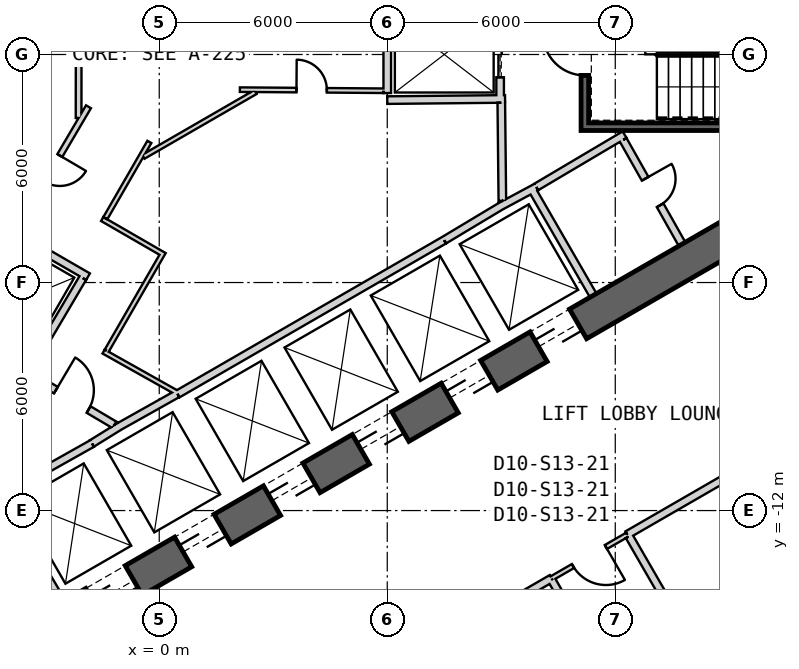
"""IFC4 building model, lengths in metres.
Left out: names, types, materials, properties, quantities, classifications, styles, units other than length and angle.
Written with IfcOpenShell. Run it as: python <this file> out.ifc"""

import sys

from ifc_helpers import new_model, si_unit, direction, frame, frame_2d, origin, place, context, subcontext, project, spatial, rectangle, extrude, element, fill, save


model = new_model("IFC4")
c1 = context("Model", 3, precision=1e-05, world=origin(), true_north=direction((0.0, 1.0)))
c2 = subcontext(c1, "Body", "Model", "MODEL_VIEW")
j1 = project(units=[si_unit("LENGTHUNIT", "METRE"), si_unit("PLANEANGLEUNIT", "RADIAN")], contexts=[c1])
p1 = place(None, origin())
s1 = spatial("IfcSite", under=j1, at=p1, CompositionType="ELEMENT")
p2 = place(p1, origin())
s2 = spatial("IfcBuilding", under=s1, at=p2, CompositionType="ELEMENT")
p3 = place(p2, frame((0.0, 0.0, 217.2)))
s3 = spatial("IfcBuildingStorey", under=s2, at=p3, CompositionType="ELEMENT", Elevation=217.2)
p4 = place(p3, frame((-7.825, -17.97, 0.0), z_axis=(0.0, 0.0, 1.0), x_axis=(0.866028369851, 0.499994862586, 0.0)))
e1 = element("IfcWall", 1, at=p4, inside=s3, PredefinedType="SHEAR", context=c2, shape_type="SweptSolid", body=[
    extrude(rectangle(XDim=31.523, YDim=0.9, at=frame_2d((15.762, 0.0))), origin(), (0.0, 0.0, 1.0), 4.0),
])
p5 = place(p4, frame((7.062, 0.0, 0.0)))
e2 = element("IfcOpeningElement", 2, at=p5, cuts=e1, PredefinedType="OPENING", context=c2, shape_type="SweptSolid", body=[
    extrude(rectangle(XDim=1.2, YDim=2.4, at=frame_2d((0.6, 1.2))), frame((0.0, 0.46, 0.0), z_axis=(0.0, -1.0, 0.0), x_axis=(1.0, 0.0, 0.0)), (0.0, 0.0, 1.0), 0.92),
])
p6 = place(p4, frame((9.762, 0.0, 0.0)))
e3 = element("IfcOpeningElement", 3, at=p6, cuts=e1, PredefinedType="OPENING", context=c2, shape_type="SweptSolid", body=[
    extrude(rectangle(XDim=1.2, YDim=2.4, at=frame_2d((0.6, 1.2))), frame((0.0, 0.46, 0.0), z_axis=(0.0, -1.0, 0.0), x_axis=(1.0, 0.0, 0.0)), (0.0, 0.0, 1.0), 0.92),
])
p7 = place(p4, frame((12.462, 0.0, 0.0)))
e4 = element("IfcOpeningElement", 4, at=p7, cuts=e1, PredefinedType="OPENING", context=c2, shape_type="SweptSolid", body=[
    extrude(rectangle(XDim=1.2, YDim=2.4, at=frame_2d((0.6, 1.2))), frame((0.0, 0.46, 0.0), z_axis=(0.0, -1.0, 0.0), x_axis=(1.0, 0.0, 0.0)), (0.0, 0.0, 1.0), 0.92),
])
p8 = place(p4, frame((15.162, 0.0, 0.0)))
e5 = element("IfcOpeningElement", 5, at=p8, cuts=e1, PredefinedType="OPENING", context=c2, shape_type="SweptSolid", body=[
    extrude(rectangle(XDim=1.2, YDim=2.4, at=frame_2d((0.6, 1.2))), frame((0.0, 0.46, 0.0), z_axis=(0.0, -1.0, 0.0), x_axis=(1.0, 0.0, 0.0)), (0.0, 0.0, 1.0), 0.92),
])
p9 = place(p4, frame((17.862, 0.0, 0.0)))
e6 = element("IfcOpeningElement", 6, at=p9, cuts=e1, PredefinedType="OPENING", context=c2, shape_type="SweptSolid", body=[
    extrude(rectangle(XDim=1.2, YDim=2.4, at=frame_2d((0.6, 1.2))), frame((0.0, 0.46, 0.0), z_axis=(0.0, -1.0, 0.0), x_axis=(1.0, 0.0, 0.0)), (0.0, 0.0, 1.0), 0.92),
])
p10 = place(p4, frame((20.562, 0.0, 0.0)))
e7 = element("IfcOpeningElement", 7, at=p10, cuts=e1, PredefinedType="OPENING", context=c2, shape_type="SweptSolid", body=[
    extrude(rectangle(XDim=1.2, YDim=2.4, at=frame_2d((0.6, 1.2))), frame((0.0, 0.46, 0.0), z_axis=(0.0, -1.0, 0.0), x_axis=(1.0, 0.0, 0.0)), (0.0, 0.0, 1.0), 0.92),
])
p11 = place(p4, frame((26.712, 0.0, 0.0)))
e8 = element("IfcOpeningElement", 8, at=p11, cuts=e1, PredefinedType="OPENING", context=c2, shape_type="SweptSolid", body=[
    extrude(rectangle(XDim=1.2, YDim=2.4, at=frame_2d((0.6, 1.2))), frame((0.0, 0.46, 0.0), z_axis=(0.0, -1.0, 0.0), x_axis=(1.0, 0.0, 0.0)), (0.0, 0.0, 1.0), 0.92),
])
p12 = place(p4, frame((3.612, 0.0, 0.0)))
e9 = element("IfcOpeningElement", 9, at=p12, cuts=e1, PredefinedType="OPENING", context=c2, shape_type="SweptSolid", body=[
    extrude(rectangle(XDim=1.2, YDim=2.4, at=frame_2d((0.6, 1.2))), frame((0.0, 0.46, 0.0), z_axis=(0.0, -1.0, 0.0), x_axis=(1.0, 0.0, 0.0)), (0.0, 0.0, 1.0), 0.92),
])
p13 = place(p3, frame((0.483, -8.936, 0.0), z_axis=(0.0, 0.0, 1.0), x_axis=(0.866030989016, 0.499990325971, 0.0)))
e10 = element("IfcWall", 10, at=p13, inside=s3, PredefinedType="PLUMBINGWALL", context=c2, shape_type="SweptSolid", body=[
    extrude(rectangle(XDim=8.1, YDim=0.2, at=frame_2d((4.05, 0.0))), origin(), (0.0, 0.0, 1.0), 3.7),
])
p14 = place(p3, frame((9.795, -3.525, 0.0), z_axis=(0.0, 0.0, 1.0), x_axis=(0.499984717929, -0.866034226713, 0.0)))
e11 = element("IfcWall", 11, at=p14, inside=s3, PredefinedType="PLUMBINGWALL", context=c2, shape_type="SweptSolid", body=[
    extrude(rectangle(XDim=3.25, YDim=0.2, at=frame_2d((1.625, 0.0))), origin(), (0.0, 0.0, 1.0), 3.7),
])
p15 = place(p3, frame((8.974, -3.999, 0.0), z_axis=(0.0, 0.0, 1.0), x_axis=(0.880907015104, 0.473289373154, 0.0)))
e12 = element("IfcWall", 12, at=p15, inside=s3, PredefinedType="PLUMBINGWALL", context=c2, shape_type="SweptSolid", body=[
    extrude(rectangle(XDim=1.078, YDim=0.2, at=frame_2d((0.539, 0.0))), origin(), (0.0, 0.0, 1.0), 3.7),
])
p16 = place(p3, frame((7.497, -4.886, 0.0), z_axis=(0.0, 0.0, 1.0), x_axis=(0.857516281273, 0.51445682749, 0.0)))
e13 = element("IfcWall", 13, at=p16, inside=s3, PredefinedType="PLUMBINGWALL", context=c2, shape_type="SweptSolid", body=[
    extrude(rectangle(XDim=1.845, YDim=0.2, at=frame_2d((0.922, 0.0))), origin(), (0.0, 0.0, 1.0), 3.7),
])
p17 = place(p3, frame((-2.558, -14.409, 0.0), z_axis=(0.0, 0.0, 1.0), x_axis=(-0.507997497166, 0.861358544901, 0.0)))
e14 = element("IfcWall", 14, at=p17, inside=s3, PredefinedType="PLUMBINGWALL", context=c2, shape_type="SweptSolid", body=[
    extrude(rectangle(XDim=3.35, YDim=0.2, at=frame_2d((1.675, 0.0))), origin(), (0.0, 0.0, 1.0), 3.7),
])
p18 = place(p3, frame((-1.769, -10.237, 0.0), z_axis=(0.0, 0.0, 1.0), x_axis=(-0.871534483978, -0.490334215854, 0.0)))
e15 = element("IfcWall", 15, at=p18, inside=s3, PredefinedType="PLUMBINGWALL", context=c2, shape_type="SweptSolid", body=[
    extrude(rectangle(XDim=2.7, YDim=0.2, at=frame_2d((1.35, 0.0))), origin(), (0.0, 0.0, 1.0), 3.7),
])
p19 = place(p3, frame((-1.024, -9.771, 0.0), z_axis=(0.0, 0.0, 1.0), x_axis=(-0.850348075135, -0.526220629693, 0.0)))
e16 = element("IfcWall", 16, at=p19, inside=s3, PredefinedType="PLUMBINGWALL", context=c2, shape_type="SweptSolid", body=[
    extrude(rectangle(XDim=0.878, YDim=0.2, at=frame_2d((0.439, 0.0))), origin(), (0.0, 0.0, 1.0), 3.7),
])
p20 = place(p3, frame((-1.13, -9.832, 0.0), z_axis=(0.0, 0.0, 1.0), x_axis=(0.871988740738, 0.489525929882, 0.0)))
e17 = element("IfcWall", 17, at=p20, inside=s3, PredefinedType="PLUMBINGWALL", context=c2, shape_type="SweptSolid", body=[
    extrude(rectangle(XDim=1.845, YDim=0.2, at=frame_2d((0.922, 0.0))), origin(), (0.0, 0.0, 1.0), 3.7),
])
p21 = place(p3, frame((11.1, -1.9, -0.3), z_axis=(0.0, 0.0, 1.0), x_axis=(1.0, 0.0, 0.0)))
e18 = element("IfcWall", 18, at=p21, inside=s3, PredefinedType="SHEAR", context=c2, shape_type="SweptSolid", body=[
    extrude(rectangle(XDim=7.9, YDim=0.2, at=frame_2d((3.95, 0.0))), origin(), (0.0, 0.0, 1.0), 4.0),
])
p22 = place(p3, frame((11.2, -1.8, -0.3), z_axis=(0.0, 0.0, 1.0), x_axis=(0.0, 1.0, 0.0)))
e19 = element("IfcWall", 19, at=p22, inside=s3, PredefinedType="SHEAR", context=c2, shape_type="SweptSolid", body=[
    extrude(rectangle(XDim=3.6, YDim=0.2, at=frame_2d((1.8, 0.0))), origin(), (0.0, 0.0, 1.0), 4.0),
])
p23 = place(p22, frame((1.25, 0.0, 0.3)))
e20 = element("IfcOpeningElement", 20, at=p23, cuts=e19, PredefinedType="OPENING", context=c2, shape_type="SweptSolid", body=[
    extrude(rectangle(XDim=1.1, YDim=2.1, at=frame_2d((0.55, 1.05))), frame((0.0, 0.11, 0.0), z_axis=(0.0, -1.0, 0.0), x_axis=(1.0, 0.0, 0.0)), (0.0, 0.0, 1.0), 0.22),
])
p24 = place(p3, frame((8.97, 1.2, 0.0), z_axis=(0.0, 0.0, 1.0), x_axis=(0.0, -1.0, 0.0)))
e21 = element("IfcWall", 21, at=p24, inside=s3, PredefinedType="PLUMBINGWALL", context=c2, shape_type="SweptSolid", body=[
    extrude(rectangle(XDim=2.4, YDim=0.2, at=frame_2d((1.2, 0.0))), origin(), (0.0, 0.0, 1.0), 3.7),
])
p25 = place(p24, frame((0.6, 0.0, 0.0)))
e22 = element("IfcOpeningElement", 22, at=p25, cuts=e21, PredefinedType="OPENING", context=c2, shape_type="SweptSolid", body=[
    extrude(rectangle(XDim=1.2, YDim=2.4, at=frame_2d((0.6, 1.2))), frame((0.0, 0.11, 0.0), z_axis=(0.0, -1.0, 0.0), x_axis=(1.0, 0.0, 0.0)), (0.0, 0.0, 1.0), 0.22),
])
p26 = place(p3, frame((9.1, -1.169, 0.0), z_axis=(0.0, 0.0, 1.0), x_axis=(-0.999949988, -0.010001074852, 0.0)))
e23 = element("IfcWall", 23, at=p26, inside=s3, PredefinedType="PLUMBINGWALL", context=c2, shape_type="SweptSolid", body=[
    extrude(rectangle(XDim=3.1, YDim=0.2, at=frame_2d((1.55, 0.0))), origin(), (0.0, 0.0, 1.0), 3.7),
])
p27 = place(p3, frame((6.0, -1.014, 0.0), z_axis=(0.0, 0.0, 1.0), x_axis=(0.0, 1.0, 0.0)))
e24 = element("IfcWall", 24, at=p27, inside=s3, PredefinedType="PLUMBINGWALL", context=c2, shape_type="SweptSolid", body=[
    extrude(rectangle(XDim=2.314, YDim=0.2, at=frame_2d((1.157, 0.0))), origin(), (0.0, 0.0, 1.0), 3.7),
])
p28 = place(p3, frame((-3.892, -4.681, 0.0), z_axis=(0.0, 0.0, 1.0), x_axis=(0.866009305107, -0.50002788269, 0.0)))
e25 = element("IfcWall", 25, at=p28, inside=s3, PredefinedType="PLUMBINGWALL", context=c2, shape_type="SweptSolid", body=[
    extrude(rectangle(XDim=2.329, YDim=0.2, at=frame_2d((1.165, 0.0))), origin(), (0.0, 0.0, 1.0), 3.7),
])
p29 = place(p3, frame((-2.012, -5.882, 0.0), z_axis=(0.0, 0.0, 1.0), x_axis=(-0.508619639323, -0.860991325447, 0.0)))
e26 = element("IfcWall", 26, at=p29, inside=s3, PredefinedType="PLUMBINGWALL", context=c2, shape_type="SweptSolid", body=[
    extrude(rectangle(XDim=3.0, YDim=0.2, at=frame_2d((1.5, 0.0))), origin(), (0.0, 0.0, 1.0), 3.7),
])
p30 = place(p3, frame((12.245, -2.109, 0.0), z_axis=(0.0, 0.0, 1.0), x_axis=(-0.860414880418, -0.509594185166, 0.0)))
e27 = element("IfcWall", 27, at=p30, inside=s3, PredefinedType="PARTITIONING", context=c2, shape_type="SweptSolid", body=[
    extrude(rectangle(XDim=2.7, YDim=0.2, at=frame_2d((1.35, 0.0))), origin(), (0.0, 0.0, 1.0), 3.7),
])
p31 = place(p3, frame((13.758, -4.99, 0.0), z_axis=(0.0, 0.0, 1.0), x_axis=(-0.491993409184, 0.87059892334, 0.0)))
e28 = element("IfcWall", 28, at=p31, inside=s3, PredefinedType="PARTITIONING", context=c2, shape_type="SweptSolid", body=[
    extrude(rectangle(XDim=3.15, YDim=0.2, at=frame_2d((1.575, 0.0))), origin(), (0.0, 0.0, 1.0), 3.7),
])
p32 = place(p31, frame((1.175, 0.0, 0.0)))
e29 = element("IfcOpeningElement", 29, at=p32, cuts=e28, PredefinedType="OPENING", context=c2, shape_type="SweptSolid", body=[
    extrude(rectangle(XDim=0.8, YDim=2.1, at=frame_2d((0.4, 1.05))), frame((0.0, 0.11, 0.0), z_axis=(0.0, -1.0, 0.0), x_axis=(1.0, 0.0, 0.0)), (0.0, 0.0, 1.0), 0.22),
])
p33 = place(p3, frame((9.029, -3.851, 0.0), z_axis=(0.0, 0.0, 1.0), x_axis=(-0.010784614026, 0.999941844359, 0.0)))
e30 = element("IfcWall", 30, at=p33, inside=s3, PredefinedType="PARTITIONING", context=c2, shape_type="SweptSolid", body=[
    extrude(rectangle(XDim=2.581, YDim=0.2, at=frame_2d((1.291, 0.0))), origin(), (0.0, 0.0, 1.0), 3.7),
])
p34 = place(p3, frame((-3.401, -8.43, 0.0), z_axis=(0.0, 0.0, 1.0), x_axis=(0.860598681535, -0.509283721849, 0.0)))
e31 = element("IfcWall", 31, at=p34, inside=s3, PredefinedType="PARTITIONING", context=c2, shape_type="SweptSolid", body=[
    extrude(rectangle(XDim=2.581, YDim=0.2, at=frame_2d((1.291, 0.0))), origin(), (0.0, 0.0, 1.0), 3.7),
])
p35 = place(p34, frame((0.791, 0.0, 0.0)))
e32 = element("IfcOpeningElement", 32, at=p35, cuts=e31, PredefinedType="OPENING", context=c2, shape_type="SweptSolid", body=[
    extrude(rectangle(XDim=1.0, YDim=2.1, at=frame_2d((0.5, 1.05))), frame((0.0, 0.11, 0.0), z_axis=(0.0, -1.0, 0.0), x_axis=(1.0, 0.0, 0.0)), (0.0, 0.0, 1.0), 0.22),
])
p36 = place(p3, frame((-2.122, -1.67, 0.0), z_axis=(0.0, 0.0, 1.0), x_axis=(0.00126831916, 0.999999195683, 0.0)))
e33 = element("IfcWall", 33, at=p36, inside=s3, PredefinedType="PLUMBINGWALL", context=c2, shape_type="SweptSolid", body=[
    extrude(rectangle(XDim=3.465, YDim=0.15, at=frame_2d((1.732, 0.0))), origin(), (0.0, 0.0, 1.0), 3.7),
])
p37 = place(p3, frame((-3.776, -4.633, 0.0), z_axis=(0.0, 0.0, 1.0), x_axis=(0.506548448152, 0.862211499387, 0.0)))
e34 = element("IfcWall", 34, at=p37, inside=s3, PredefinedType="PLUMBINGWALL", context=c2, shape_type="SweptSolid", body=[
    extrude(rectangle(XDim=3.778, YDim=0.15, at=frame_2d((1.889, 0.0))), origin(), (0.0, 0.0, 1.0), 3.7),
])
p38 = place(p37, frame((1.489, 0.0, 0.0)))
e35 = element("IfcOpeningElement", 35, at=p38, cuts=e34, PredefinedType="OPENING", context=c2, shape_type="SweptSolid", body=[
    extrude(rectangle(XDim=0.8, YDim=2.1, at=frame_2d((0.4, 1.05))), frame((0.0, 0.085, 0.0), z_axis=(0.0, -1.0, 0.0), x_axis=(1.0, 0.0, 0.0)), (0.0, 0.0, 1.0), 0.17),
])
p39 = place(p3, frame((-1.464, -7.816, 0.0), z_axis=(0.0, 0.0, 1.0), x_axis=(0.871880202732, -0.489719217597, 0.0)))
e36 = element("IfcWall", 36, at=p39, inside=s3, PredefinedType="PARTITIONING", context=c2, shape_type="SweptSolid", body=[
    extrude(rectangle(XDim=2.224, YDim=0.12, at=frame_2d((1.112, 0.0))), origin(), (0.0, 0.0, 1.0), 3.7),
])
p40 = place(p3, frame((0.118, -5.195, 0.0), z_axis=(0.0, 0.0, 1.0), x_axis=(-0.499990139034, -0.866031096941, 0.0)))
e37 = element("IfcWall", 37, at=p40, inside=s3, PredefinedType="PARTITIONING", context=c2, shape_type="SweptSolid", body=[
    extrude(rectangle(XDim=3.0, YDim=0.12, at=frame_2d((1.5, 0.0))), origin(), (0.0, 0.0, 1.0), 3.7),
])
p41 = place(p3, frame((-1.501, -4.33, 0.0), z_axis=(0.0, 0.0, 1.0), x_axis=(0.866059624469, -0.499940723351, 0.0)))
e38 = element("IfcWall", 38, at=p41, inside=s3, PredefinedType="PARTITIONING", context=c2, shape_type="SweptSolid", body=[
    extrude(rectangle(XDim=1.775, YDim=0.12, at=frame_2d((0.888, 0.0))), origin(), (0.0, 0.0, 1.0), 3.7),
])
p42 = place(p3, frame((-0.26, -2.3, 0.0), z_axis=(0.0, 0.0, 1.0), x_axis=(-0.500035443578, -0.866004939458, 0.0)))
e39 = element("IfcWall", 39, at=p42, inside=s3, PredefinedType="PARTITIONING", context=c2, shape_type="SweptSolid", body=[
    extrude(rectangle(XDim=2.318, YDim=0.12, at=frame_2d((1.159, 0.0))), origin(), (0.0, 0.0, 1.0), 3.7),
])
p43 = place(p3, frame((2.532, -0.988, 0.0), z_axis=(0.0, 0.0, 1.0), x_axis=(-0.866023141178, -0.500003918929, 0.0)))
e40 = element("IfcWall", 40, at=p43, inside=s3, PredefinedType="PARTITIONING", context=c2, shape_type="SweptSolid", body=[
    extrude(rectangle(XDim=3.404, YDim=0.12, at=frame_2d((1.702, 0.0))), origin(), (0.0, 0.0, 1.0), 3.7),
])
p44 = place(p3, frame((5.9, -0.954, 0.0), z_axis=(0.0, 0.0, 1.0), x_axis=(-0.999970929415, 0.00762498027, 0.0)))
e41 = element("IfcWall", 41, at=p44, inside=s3, PredefinedType="PARTITIONING", context=c2, shape_type="SweptSolid", body=[
    extrude(rectangle(XDim=3.778, YDim=0.12, at=frame_2d((1.889, 0.0))), origin(), (0.0, 0.0, 1.0), 3.7),
])
p45 = place(p44, frame((1.489, 0.0, 0.0)))
e42 = element("IfcOpeningElement", 42, at=p45, cuts=e41, PredefinedType="OPENING", context=c2, shape_type="SweptSolid", body=[
    extrude(rectangle(XDim=0.8, YDim=2.1, at=frame_2d((0.4, 1.05))), frame((0.0, 0.07, 0.0), z_axis=(0.0, -1.0, 0.0), x_axis=(1.0, 0.0, 0.0)), (0.0, 0.0, 1.0), 0.14),
])
p46 = place(p3, frame((12.317, -12.634, 0.0), z_axis=(0.0, 0.0, 1.0), x_axis=(-0.86602648383, -0.499998129301, 0.0)))
e43 = element("IfcWall", 43, at=p46, inside=s3, PredefinedType="PARTITIONING", context=c2, shape_type="SweptSolid", body=[
    extrude(rectangle(XDim=2.3, YDim=0.12, at=frame_2d((1.15, 0.0))), origin(), (0.0, 0.0, 1.0), 3.7),
])
p47 = place(p46, frame((0.65, 0.0, 0.0)))
e44 = element("IfcOpeningElement", 44, at=p47, cuts=e43, PredefinedType="OPENING", context=c2, shape_type="SweptSolid", body=[
    extrude(rectangle(XDim=1.0, YDim=2.1, at=frame_2d((0.5, 1.05))), frame((0.0, 0.07, 0.0), z_axis=(0.0, -1.0, 0.0), x_axis=(1.0, 0.0, 0.0)), (0.0, 0.0, 1.0), 0.14),
])
p48 = place(p3, frame((-6.019, -23.22, 0.0), z_axis=(0.0, 0.0, 1.0), x_axis=(0.86602143297, 0.50000687759, 0.0)))
e45 = element("IfcWall", 45, at=p48, inside=s3, PredefinedType="PARTITIONING", context=c2, shape_type="SweptSolid", body=[
    extrude(rectangle(XDim=18.873, YDim=0.2, at=frame_2d((9.437, 0.0))), origin(), (0.0, 0.0, 1.0), 2.88),
])
p49 = place(p3, frame((12.317, -12.634, 0.0), z_axis=(0.0, 0.0, 1.0), x_axis=(0.866028561818, 0.499994530085, 0.0)))
e46 = element("IfcWall", 46, at=p49, inside=s3, PredefinedType="PARTITIONING", context=c2, shape_type="SweptSolid", body=[
    extrude(rectangle(XDim=12.273, YDim=0.2, at=frame_2d((6.136, 0.0))), origin(), (0.0, 0.0, 1.0), 2.88),
])
p50 = place(p3, frame((18.412, -23.15, 0.0), z_axis=(0.0, 0.0, 1.0), x_axis=(-0.500010196161, 0.866019516948, 0.0)))
e47 = element("IfcWall", 47, at=p50, inside=s3, PredefinedType="PARTITIONING", context=c2, shape_type="SweptSolid", body=[
    extrude(rectangle(XDim=12.094, YDim=0.2, at=frame_2d((6.047, 0.0))), origin(), (0.0, 0.0, 1.0), 3.7),
])
p51 = place(p50, frame((5.547, 0.0, 0.0)))
e48 = element("IfcOpeningElement", 48, at=p51, cuts=e47, PredefinedType="OPENING", context=c2, shape_type="SweptSolid", body=[
    extrude(rectangle(XDim=1.0, YDim=2.1, at=frame_2d((0.5, 1.05))), frame((0.0, 0.11, 0.0), z_axis=(0.0, -1.0, 0.0), x_axis=(1.0, 0.0, 0.0)), (0.0, 0.0, 1.0), 0.22),
])
p52 = place(p3, frame((10.338, -13.846, 0.0), z_axis=(0.0, 0.0, 1.0), x_axis=(0.499990787361, -0.866030722639, 0.0)))
e49 = element("IfcWall", 49, at=p52, inside=s3, PredefinedType="PARTITIONING", context=c2, shape_type="SweptSolid", body=[
    extrude(rectangle(XDim=12.155, YDim=0.2, at=frame_2d((6.078, 0.0))), origin(), (0.0, 0.0, 1.0), 3.7),
])
p53 = place(p52, frame((10.955, 0.0, 0.0)))
e50 = element("IfcOpeningElement", 50, at=p53, cuts=e49, PredefinedType="OPENING", context=c2, shape_type="SweptSolid", body=[
    extrude(rectangle(XDim=1.0, YDim=2.1, at=frame_2d((0.5, 1.05))), frame((0.0, 0.11, 0.0), z_axis=(0.0, -1.0, 0.0), x_axis=(1.0, 0.0, 0.0)), (0.0, 0.0, 1.0), 0.22),
])
p54 = place(p23, origin())
e51 = element("IfcDoor", 51, at=p54, inside=s3, OperationType="SINGLE_SWING_LEFT", PredefinedType="USERDEFINED", context=c2, shape_type="SweptSolid", body=[
    extrude(rectangle(XDim=1.1, YDim=2.1, at=frame_2d((0.55, 1.05))), frame((0.0, 0.025, 0.0), z_axis=(0.0, -1.0, 0.0), x_axis=(1.0, 0.0, 0.0)), (0.0, 0.0, 1.0), 0.05),
])
fill(e20, e51)
p55 = place(p25, origin())
e52 = element("IfcDoor", 52, at=p55, inside=s3, OperationType="SLIDING_TO_LEFT", PredefinedType="USERDEFINED", context=c2, shape_type="SweptSolid", body=[
    extrude(rectangle(XDim=1.2, YDim=2.4, at=frame_2d((0.6, 1.2))), frame((0.0, 0.025, 0.0), z_axis=(0.0, -1.0, 0.0), x_axis=(1.0, 0.0, 0.0)), (0.0, 0.0, 1.0), 0.05),
])
fill(e22, e52)
p56 = place(p35, origin())
e53 = element("IfcDoor", 53, at=p56, inside=s3, OperationType="SINGLE_SWING_LEFT", PredefinedType="USERDEFINED", context=c2, shape_type="SweptSolid", body=[
    extrude(rectangle(XDim=1.0, YDim=2.1, at=frame_2d((0.5, 1.05))), frame((0.0, 0.025, 0.0), z_axis=(0.0, -1.0, 0.0), x_axis=(1.0, 0.0, 0.0)), (0.0, 0.0, 1.0), 0.05),
])
fill(e32, e53)
p57 = place(p38, origin())
e54 = element("IfcDoor", 54, at=p57, inside=s3, OperationType="SINGLE_SWING_LEFT", PredefinedType="USERDEFINED", context=c2, shape_type="SweptSolid", body=[
    extrude(rectangle(XDim=0.8, YDim=2.1, at=frame_2d((0.4, 1.05))), frame((0.0, 0.025, 0.0), z_axis=(0.0, -1.0, 0.0), x_axis=(1.0, 0.0, 0.0)), (0.0, 0.0, 1.0), 0.05),
])
fill(e35, e54)
p58 = place(p45, origin())
e55 = element("IfcDoor", 55, at=p58, inside=s3, OperationType="SINGLE_SWING_LEFT", PredefinedType="USERDEFINED", context=c2, shape_type="SweptSolid", body=[
    extrude(rectangle(XDim=0.8, YDim=2.1, at=frame_2d((0.4, 1.05))), frame((0.0, 0.025, 0.0), z_axis=(0.0, -1.0, 0.0), x_axis=(1.0, 0.0, 0.0)), (0.0, 0.0, 1.0), 0.05),
])
fill(e42, e55)
p59 = place(p32, origin())
e56 = element("IfcDoor", 56, at=p59, inside=s3, OperationType="SINGLE_SWING_LEFT", PredefinedType="USERDEFINED", context=c2, shape_type="SweptSolid", body=[
    extrude(rectangle(XDim=0.8, YDim=2.1, at=frame_2d((0.4, 1.05))), frame((0.0, 0.025, 0.0), z_axis=(0.0, -1.0, 0.0), x_axis=(1.0, 0.0, 0.0)), (0.0, 0.0, 1.0), 0.05),
])
fill(e29, e56)
p60 = place(p47, origin())
e57 = element("IfcDoor", 57, at=p60, inside=s3, OperationType="SINGLE_SWING_RIGHT", PredefinedType="NOTDEFINED", context=c2, shape_type="SweptSolid", body=[
    extrude(rectangle(XDim=1.0, YDim=2.1, at=frame_2d((0.5, 1.05))), frame((0.0, 0.025, 0.0), z_axis=(0.0, -1.0, 0.0), x_axis=(1.0, 0.0, 0.0)), (0.0, 0.0, 1.0), 0.05),
])
fill(e44, e57)
p61 = place(p5, origin())
e58 = element("IfcDoor", 58, at=p61, inside=s3, OperationType="SLIDING_TO_LEFT", PredefinedType="USERDEFINED", context=c2, shape_type="SweptSolid", body=[
    extrude(rectangle(XDim=1.2, YDim=2.4, at=frame_2d((0.6, 1.2))), frame((0.0, 0.025, 0.0), z_axis=(0.0, -1.0, 0.0), x_axis=(1.0, 0.0, 0.0)), (0.0, 0.0, 1.0), 0.05),
])
fill(e2, e58)
p62 = place(p6, origin())
e59 = element("IfcDoor", 59, at=p62, inside=s3, OperationType="SLIDING_TO_LEFT", PredefinedType="USERDEFINED", context=c2, shape_type="SweptSolid", body=[
    extrude(rectangle(XDim=1.2, YDim=2.4, at=frame_2d((0.6, 1.2))), frame((0.0, 0.025, 0.0), z_axis=(0.0, -1.0, 0.0), x_axis=(1.0, 0.0, 0.0)), (0.0, 0.0, 1.0), 0.05),
])
fill(e3, e59)
p63 = place(p7, origin())
e60 = element("IfcDoor", 60, at=p63, inside=s3, OperationType="SLIDING_TO_LEFT", PredefinedType="USERDEFINED", context=c2, shape_type="SweptSolid", body=[
    extrude(rectangle(XDim=1.2, YDim=2.4, at=frame_2d((0.6, 1.2))), frame((0.0, 0.025, 0.0), z_axis=(0.0, -1.0, 0.0), x_axis=(1.0, 0.0, 0.0)), (0.0, 0.0, 1.0), 0.05),
])
fill(e4, e60)
p64 = place(p8, origin())
e61 = element("IfcDoor", 61, at=p64, inside=s3, OperationType="SLIDING_TO_LEFT", PredefinedType="USERDEFINED", context=c2, shape_type="SweptSolid", body=[
    extrude(rectangle(XDim=1.2, YDim=2.4, at=frame_2d((0.6, 1.2))), frame((0.0, 0.025, 0.0), z_axis=(0.0, -1.0, 0.0), x_axis=(1.0, 0.0, 0.0)), (0.0, 0.0, 1.0), 0.05),
])
fill(e5, e61)
p65 = place(p9, origin())
e62 = element("IfcDoor", 62, at=p65, inside=s3, OperationType="SLIDING_TO_LEFT", PredefinedType="USERDEFINED", context=c2, shape_type="SweptSolid", body=[
    extrude(rectangle(XDim=1.2, YDim=2.4, at=frame_2d((0.6, 1.2))), frame((0.0, 0.025, 0.0), z_axis=(0.0, -1.0, 0.0), x_axis=(1.0, 0.0, 0.0)), (0.0, 0.0, 1.0), 0.05),
])
fill(e6, e62)
p66 = place(p10, origin())
e63 = element("IfcDoor", 63, at=p66, inside=s3, OperationType="SLIDING_TO_LEFT", PredefinedType="USERDEFINED", context=c2, shape_type="SweptSolid", body=[
    extrude(rectangle(XDim=1.2, YDim=2.4, at=frame_2d((0.6, 1.2))), frame((0.0, 0.025, 0.0), z_axis=(0.0, -1.0, 0.0), x_axis=(1.0, 0.0, 0.0)), (0.0, 0.0, 1.0), 0.05),
])
fill(e7, e63)
save(model, sys.argv[1])
